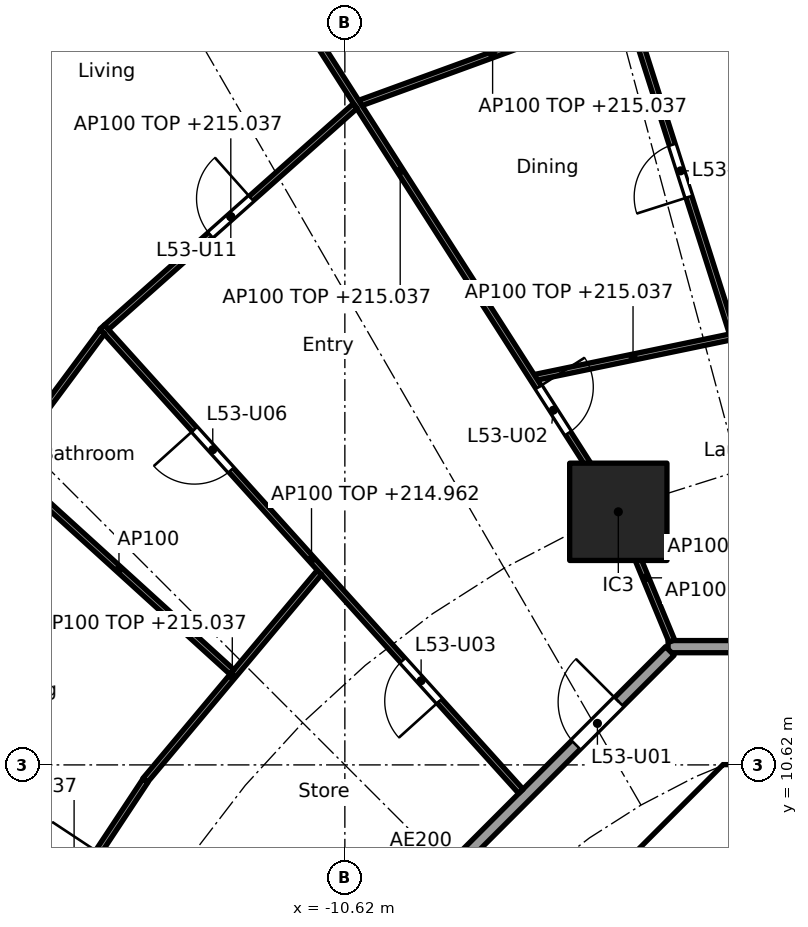
"""IFC4 building model, lengths in metres.
Left out: names, types, materials, properties, quantities, classifications, styles, units other than length and angle.
Written with IfcOpenShell. Run it as: python <this file> out.ifc"""

import sys

from ifc_helpers import new_model, si_unit, direction, frame, frame_2d, origin, origin_2d, place, context, subcontext, project, spatial, polyline, rectangle, outline, extrude, element, fill, save


model = new_model("IFC4")
c1 = context("Model", 3, precision=1e-05, world=origin(), true_north=direction((0.0, 1.0)))
c2 = subcontext(c1, "Body", "Model", "MODEL_VIEW")
j1 = project(units=[si_unit("LENGTHUNIT", "METRE"), si_unit("PLANEANGLEUNIT", "RADIAN")], contexts=[c1])
p1 = place(None, origin())
s1 = spatial("IfcSite", under=j1, at=p1, CompositionType="ELEMENT")
p2 = place(p1, origin())
s2 = spatial("IfcBuilding", under=s1, at=p2, CompositionType="ELEMENT")
p3 = place(p2, frame((0.0, 0.0, 212.2)))
s3 = spatial("IfcBuildingStorey", under=s2, at=p3, CompositionType="ELEMENT", Elevation=212.2)
p4 = place(p3, frame((-6.123, 14.782, 0.0), z_axis=(0.0, 0.0, 1.0), x_axis=(1.0, 0.0, 0.0)))
e1 = element("IfcColumn", 1, at=p4, inside=s3, PredefinedType="COLUMN", context=c2, shape_type="SweptSolid", body=[
    extrude(rectangle(XDim=1.6, YDim=1.6, at=origin_2d()), origin(), (0.0, 0.0, 1.0), 3.7),
])
p5 = place(p3, frame((-4.613, 9.988, 0.0), z_axis=(0.0, 0.0, 1.0), x_axis=(-0.707106781187, -0.707106781187, 0.0)))
e2 = element("IfcWall", 2, at=p5, inside=s3, PredefinedType="SHEAR", context=c2, shape_type="SweptSolid", body=[
    extrude(rectangle(XDim=7.602, YDim=0.6, at=frame_2d((3.801, 0.0))), origin(), (0.0, 0.0, 1.0), 3.44),
])
p6 = place(p5, frame((0.351, 0.0, 0.0)))
e3 = element("IfcOpeningElement", 3, at=p6, cuts=e2, PredefinedType="OPENING", context=c2, shape_type="SweptSolid", body=[
    extrude(rectangle(XDim=1.1, YDim=2.1, at=frame_2d((0.55, 1.05))), frame((0.0, 0.31, 0.0), z_axis=(0.0, -1.0, 0.0), x_axis=(1.0, 0.0, 0.0)), (0.0, 0.0, 1.0), 0.62),
])
p7 = place(p3, origin())
e4 = element("IfcWall", 4, at=p7, inside=s3, PredefinedType="SHEAR", context=c2, shape_type="SweptSolid", body=[
    extrude(outline(polyline([(-4.152, 10.025), (-4.401, 9.776), (-4.825, 10.2), (-4.401, 10.625), (4.401, 10.625), (4.825, 10.2), (4.401, 9.776), (4.152, 10.025), (-4.152, 10.025)])), origin(), (0.0, 0.0, 1.0), 3.44),
])
p8 = place(p3, frame((-14.829, 6.141, 0.0), z_axis=(0.0, 0.0, 1.0), x_axis=(-0.929202069098, 0.36957206981, 0.0)))
e5 = element("IfcWall", 5, at=p8, inside=s3, PredefinedType="PARTITIONING", context=c2, shape_type="SweptSolid", body=[
    extrude(rectangle(XDim=9.957, YDim=0.2, at=frame_2d((4.978, 0.0))), origin(), (0.0, 0.0, 1.0), 2.837),
])
p9 = place(p3, frame((5.104, 12.565, 0.0), z_axis=(0.0, 0.0, 1.0), x_axis=(-1.0, 0.0, 0.0)))
e6 = element("IfcWall", 6, at=p9, inside=s3, PredefinedType="PARTITIONING", context=c2, shape_type="SweptSolid", body=[
    extrude(rectangle(XDim=10.409, YDim=0.2, at=frame_2d((5.205, 0.0))), origin(), (0.0, 0.0, 1.0), 3.44),
])
p10 = place(p3, frame((-5.275, 12.494, 0.0), z_axis=(0.0, 0.0, 1.0), x_axis=(-0.707106781187, -0.707106781187, 0.0)))
e7 = element("IfcWall", 7, at=p10, inside=s3, PredefinedType="PARTITIONING", context=c2, shape_type="SweptSolid", body=[
    extrude(rectangle(XDim=10.209, YDim=0.2, at=frame_2d((5.104, 0.0))), origin(), (0.0, 0.0, 1.0), 3.44),
])
p11 = place(p10, frame((1.185, 0.0, 0.0)))
e8 = element("IfcOpeningElement", 8, at=p11, cuts=e7, PredefinedType="OPENING", context=c2, shape_type="SweptSolid", body=[
    extrude(rectangle(XDim=1.0, YDim=2.1, at=frame_2d((0.5, 1.05))), frame((0.0, 0.11, 0.0), z_axis=(0.0, -1.0, 0.0), x_axis=(1.0, 0.0, 0.0)), (0.0, 0.0, 1.0), 0.22),
])
p12 = place(p3, frame((-4.215, 17.62, 0.0), z_axis=(0.0, 0.0, 1.0), x_axis=(-0.303985237897, 0.952676742206, 0.0)))
e9 = element("IfcWall", 9, at=p12, inside=s3, PredefinedType="PARTITIONING", context=c2, shape_type="SweptSolid", body=[
    extrude(rectangle(XDim=11.499, YDim=0.1, at=frame_2d((5.75, 0.0))), origin(), (0.0, 0.0, 1.0), 2.837),
])
p13 = place(p12, frame((2.457, 0.0, 0.0)))
e10 = element("IfcOpeningElement", 10, at=p13, cuts=e9, PredefinedType="OPENING", context=c2, shape_type="SweptSolid", body=[
    extrude(rectangle(XDim=0.9, YDim=2.1, at=frame_2d((0.45, 1.05))), frame((0.0, 0.06, 0.0), z_axis=(0.0, -1.0, 0.0), x_axis=(1.0, 0.0, 0.0)), (0.0, 0.0, 1.0), 0.12),
])
p14 = place(p12, frame((8.181, 0.0, 0.0)))
e11 = element("IfcOpeningElement", 11, at=p14, cuts=e9, PredefinedType="OPENING", context=c2, shape_type="SweptSolid", body=[
    extrude(rectangle(XDim=0.9, YDim=2.1, at=frame_2d((0.45, 1.05))), frame((0.0, 0.06, 0.0), z_axis=(0.0, -1.0, 0.0), x_axis=(1.0, 0.0, 0.0)), (0.0, 0.0, 1.0), 0.12),
])
p15 = place(p3, frame((-4.28, 17.657, 0.0), z_axis=(0.0, 0.0, 1.0), x_axis=(-0.979205232861, -0.202872156637, 0.0)))
e12 = element("IfcWall", 12, at=p15, inside=s3, PredefinedType="PARTITIONING", context=c2, shape_type="SweptSolid", body=[
    extrude(rectangle(XDim=3.271, YDim=0.1, at=frame_2d((1.635, 0.0))), origin(), (0.0, 0.0, 1.0), 2.837),
])
p16 = place(p3, frame((-6.014, 23.094, 0.0), z_axis=(0.0, 0.0, 1.0), x_axis=(-0.939417400947, -0.342775359089, 0.0)))
e13 = element("IfcWall", 13, at=p16, inside=s3, PredefinedType="PARTITIONING", context=c2, shape_type="SweptSolid", body=[
    extrude(rectangle(XDim=4.633, YDim=0.1, at=frame_2d((2.316, 0.0))), origin(), (0.0, 0.0, 1.0), 2.837),
])
p17 = place(p3, frame((-5.243, 12.657, 0.0), z_axis=(0.0, 0.0, 1.0), x_axis=(-0.382757529444, 0.923848837015, 0.0)))
e14 = element("IfcWall", 14, at=p17, inside=s3, PredefinedType="PARTITIONING", context=c2, shape_type="SweptSolid", body=[
    extrude(rectangle(XDim=2.25, YDim=0.1, at=frame_2d((1.125, 0.0))), origin(), (0.0, 0.0, 1.0), 3.44),
])
p18 = place(p3, frame((-6.15, 14.824, 0.0), z_axis=(0.0, 0.0, 1.0), x_axis=(-0.538870687577, 0.842388498301, 0.0)))
e15 = element("IfcWall", 15, at=p18, inside=s3, PredefinedType="PARTITIONING", context=c2, shape_type="SweptSolid", body=[
    extrude(rectangle(XDim=13.213, YDim=0.1, at=frame_2d((6.606, 0.0))), origin(), (0.0, 0.0, 1.0), 2.837),
])
p19 = place(p18, frame((1.483, 0.0, 0.0)))
e16 = element("IfcOpeningElement", 16, at=p19, cuts=e15, PredefinedType="OPENING", context=c2, shape_type="SweptSolid", body=[
    extrude(rectangle(XDim=0.9, YDim=2.1, at=frame_2d((0.45, 1.05))), frame((0.0, 0.06, 0.0), z_axis=(0.0, -1.0, 0.0), x_axis=(1.0, 0.0, 0.0)), (0.0, 0.0, 1.0), 0.12),
])
p20 = place(p3, frame((-10.45, 21.455, 0.0), z_axis=(0.0, 0.0, 1.0), x_axis=(-0.747150931973, -0.66465441009, 0.0)))
e17 = element("IfcWall", 17, at=p20, inside=s3, PredefinedType="PARTITIONING", context=c2, shape_type="SweptSolid", body=[
    extrude(rectangle(XDim=5.475, YDim=0.1, at=frame_2d((2.737, 0.0))), origin(), (0.0, 0.0, 1.0), 2.837),
])
p21 = place(p20, frame((2.288, 0.0, 0.0)))
e18 = element("IfcOpeningElement", 18, at=p21, cuts=e17, PredefinedType="OPENING", context=c2, shape_type="SweptSolid", body=[
    extrude(rectangle(XDim=0.9, YDim=2.1, at=frame_2d((0.45, 1.05))), frame((0.0, 0.06, 0.0), z_axis=(0.0, -1.0, 0.0), x_axis=(1.0, 0.0, 0.0)), (0.0, 0.0, 1.0), 0.12),
])
p22 = place(p3, frame((-7.725, 10.186, 0.0), z_axis=(0.0, 0.0, 1.0), x_axis=(-0.669819599194, 0.742523874725, 0.0)))
e19 = element("IfcWall", 19, at=p22, inside=s3, PredefinedType="PARTITIONING", context=c2, shape_type="SweptSolid", body=[
    extrude(rectangle(XDim=10.282, YDim=0.1, at=frame_2d((5.141, 0.0))), origin(), (0.0, 0.0, 1.0), 2.762),
])
p23 = place(p22, frame((2.0, 0.0, 0.0)))
e20 = element("IfcOpeningElement", 20, at=p23, cuts=e19, PredefinedType="OPENING", context=c2, shape_type="SweptSolid", body=[
    extrude(rectangle(XDim=0.9, YDim=2.1, at=frame_2d((0.45, 1.05))), frame((0.0, 0.06, 0.0), z_axis=(0.0, -1.0, 0.0), x_axis=(1.0, 0.0, 0.0)), (0.0, 0.0, 1.0), 0.12),
])
p24 = place(p22, frame((7.116, 0.0, 0.0)))
e21 = element("IfcOpeningElement", 21, at=p24, cuts=e19, PredefinedType="OPENING", context=c2, shape_type="SweptSolid", body=[
    extrude(rectangle(XDim=0.9, YDim=2.1, at=frame_2d((0.45, 1.05))), frame((0.0, 0.06, 0.0), z_axis=(0.0, -1.0, 0.0), x_axis=(1.0, 0.0, 0.0)), (0.0, 0.0, 1.0), 0.12),
])
p25 = place(p3, frame((-11.039, 13.785, 0.0), z_axis=(0.0, 0.0, 1.0), x_axis=(-0.642254625966, -0.766491353784, 0.0)))
e22 = element("IfcWall", 22, at=p25, inside=s3, PredefinedType="PARTITIONING", context=c2, shape_type="SweptSolid", body=[
    extrude(rectangle(XDim=4.461, YDim=0.1, at=frame_2d((2.23, 0.0))), origin(), (0.0, 0.0, 1.0), 2.837),
])
p26 = place(p3, frame((-14.608, 17.743, 0.0), z_axis=(0.0, 0.0, 1.0), x_axis=(-0.596174489482, -0.8028548923, 0.0)))
e23 = element("IfcWall", 23, at=p26, inside=s3, PredefinedType="PARTITIONING", context=c2, shape_type="SweptSolid", body=[
    extrude(rectangle(XDim=5.442, YDim=0.1, at=frame_2d((2.721, 0.0))), origin(), (0.0, 0.0, 1.0), 2.837),
])
p27 = place(p3, frame((-12.476, 12.147, 0.0), z_axis=(0.0, 0.0, 1.0), x_axis=(-0.740129203525, 0.672464692077, 0.0)))
e24 = element("IfcWall", 24, at=p27, inside=s3, PredefinedType="PARTITIONING", context=c2, shape_type="SweptSolid", body=[
    extrude(rectangle(XDim=5.022, YDim=0.1, at=frame_2d((2.511, 0.0))), origin(), (0.0, 0.0, 1.0), 3.44),
])
p28 = place(p3, frame((-13.899, 10.363, 0.0), z_axis=(0.0, 0.0, 1.0), x_axis=(-0.551267958114, -0.834328255758, 0.0)))
e25 = element("IfcWall", 25, at=p28, inside=s3, PredefinedType="PARTITIONING", context=c2, shape_type="SweptSolid", body=[
    extrude(rectangle(XDim=4.257, YDim=0.1, at=frame_2d((2.129, 0.0))), origin(), (0.0, 0.0, 1.0), 2.837),
])
p29 = place(p28, frame((1.413, 0.0, 0.0)))
e26 = element("IfcOpeningElement", 26, at=p29, cuts=e25, PredefinedType="OPENING", context=c2, shape_type="SweptSolid", body=[
    extrude(rectangle(XDim=0.9, YDim=2.1, at=frame_2d((0.45, 1.05))), frame((0.0, 0.06, 0.0), z_axis=(0.0, -1.0, 0.0), x_axis=(1.0, 0.0, 0.0)), (0.0, 0.0, 1.0), 0.12),
])
p30 = place(p6, origin())
e27 = element("IfcDoor", 27, at=p30, inside=s3, OperationType="SINGLE_SWING_LEFT", PredefinedType="DOOR", context=c2, shape_type="SweptSolid", body=[
    extrude(rectangle(XDim=1.1, YDim=2.1, at=frame_2d((0.55, 1.05))), frame((0.0, 0.025, 0.0), z_axis=(0.0, -1.0, 0.0), x_axis=(1.0, 0.0, 0.0)), (0.0, 0.0, 1.0), 0.05),
])
fill(e3, e27)
p31 = place(p11, frame((1.0, 0.0, 0.0), x_axis=(-1.0, 0.0, 0.0)))
e28 = element("IfcDoor", 28, at=p31, inside=s3, OperationType="SINGLE_SWING_RIGHT", PredefinedType="DOOR", context=c2, shape_type="SweptSolid", body=[
    extrude(rectangle(XDim=1.0, YDim=2.1, at=frame_2d((0.5, 1.05))), frame((0.0, 0.025, 0.0), z_axis=(0.0, -1.0, 0.0), x_axis=(1.0, 0.0, 0.0)), (0.0, 0.0, 1.0), 0.05),
])
fill(e8, e28)
p32 = place(p19, frame((0.9, 0.0, 0.0), x_axis=(-1.0, 0.0, 0.0)))
e29 = element("IfcDoor", 29, at=p32, inside=s3, OperationType="SINGLE_SWING_LEFT", PredefinedType="DOOR", context=c2, shape_type="SweptSolid", body=[
    extrude(rectangle(XDim=0.9, YDim=2.1, at=frame_2d((0.45, 1.05))), frame((0.0, 0.025, 0.0), z_axis=(0.0, -1.0, 0.0), x_axis=(1.0, 0.0, 0.0)), (0.0, 0.0, 1.0), 0.05),
])
fill(e16, e29)
p33 = place(p23, origin())
e30 = element("IfcDoor", 30, at=p33, inside=s3, OperationType="SINGLE_SWING_LEFT", PredefinedType="DOOR", context=c2, shape_type="SweptSolid", body=[
    extrude(rectangle(XDim=0.9, YDim=2.1, at=frame_2d((0.45, 1.05))), frame((0.0, 0.025, 0.0), z_axis=(0.0, -1.0, 0.0), x_axis=(1.0, 0.0, 0.0)), (0.0, 0.0, 1.0), 0.05),
])
fill(e20, e30)
p34 = place(p13, origin())
e31 = element("IfcDoor", 31, at=p34, inside=s3, OperationType="SINGLE_SWING_LEFT", PredefinedType="DOOR", context=c2, shape_type="SweptSolid", body=[
    extrude(rectangle(XDim=0.9, YDim=2.1, at=frame_2d((0.45, 1.05))), frame((0.0, 0.025, 0.0), z_axis=(0.0, -1.0, 0.0), x_axis=(1.0, 0.0, 0.0)), (0.0, 0.0, 1.0), 0.05),
])
fill(e10, e31)
p35 = place(p24, origin())
e32 = element("IfcDoor", 32, at=p35, inside=s3, OperationType="SINGLE_SWING_RIGHT", PredefinedType="DOOR", context=c2, shape_type="SweptSolid", body=[
    extrude(rectangle(XDim=0.9, YDim=2.1, at=frame_2d((0.45, 1.05))), frame((0.0, 0.025, 0.0), z_axis=(0.0, -1.0, 0.0), x_axis=(1.0, 0.0, 0.0)), (0.0, 0.0, 1.0), 0.05),
])
fill(e21, e32)
p36 = place(p21, frame((0.9, 0.0, 0.0), x_axis=(-1.0, 0.0, 0.0)))
e33 = element("IfcDoor", 33, at=p36, inside=s3, OperationType="SINGLE_SWING_RIGHT", PredefinedType="DOOR", context=c2, shape_type="SweptSolid", body=[
    extrude(rectangle(XDim=0.9, YDim=2.1, at=frame_2d((0.45, 1.05))), frame((0.0, 0.025, 0.0), z_axis=(0.0, -1.0, 0.0), x_axis=(1.0, 0.0, 0.0)), (0.0, 0.0, 1.0), 0.05),
])
fill(e18, e33)
save(model, sys.argv[1])
